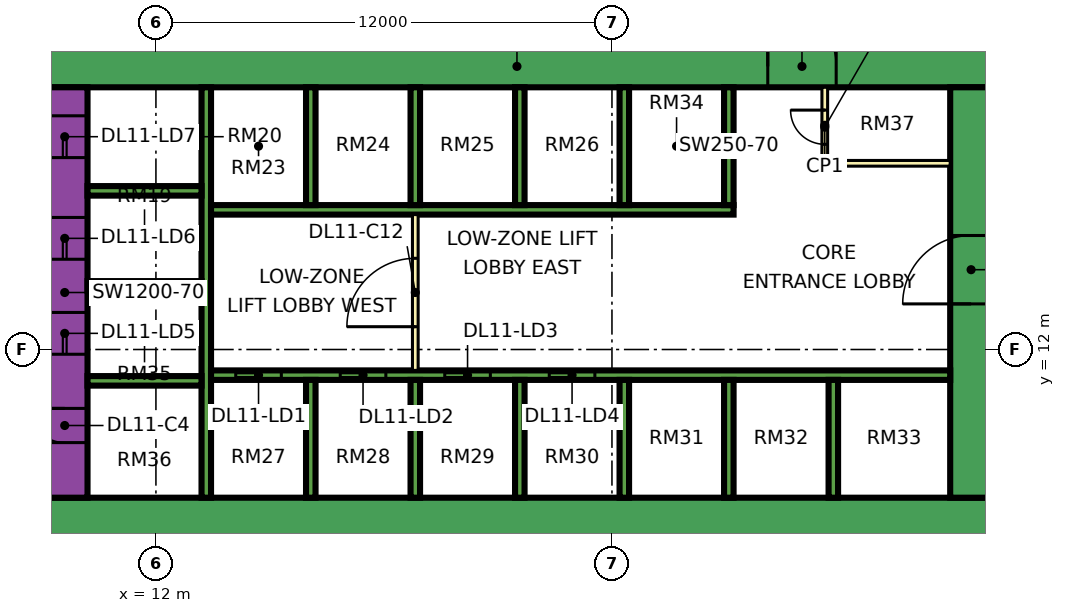
"""IFC4 building model, lengths in metres.
Left out: names, types, materials, properties, quantities, classifications, styles, units other than length and angle.
Written with IfcOpenShell. Run it as: python <this file> out.ifc"""

import sys

from ifc_helpers import new_model, si_unit, direction, frame, frame_2d, origin, place, context, subcontext, project, spatial, rectangle, extrude, element, fill, save


model = new_model("IFC4")
c1 = context("Model", 3, precision=1e-05, world=origin(), true_north=direction((0.0, 1.0)))
c2 = subcontext(c1, "Body", "Model", "MODEL_VIEW")
j1 = project(units=[si_unit("LENGTHUNIT", "METRE"), si_unit("PLANEANGLEUNIT", "RADIAN")], contexts=[c1])
p1 = place(None, origin())
s1 = spatial("IfcSite", under=j1, at=p1, CompositionType="ELEMENT")
p2 = place(p1, origin())
s2 = spatial("IfcBuilding", under=s1, at=p2, CompositionType="ELEMENT")
p3 = place(p2, frame((0.0, 0.0, 56.4)))
s3 = spatial("IfcBuildingStorey", under=s2, at=p3, CompositionType="ELEMENT", Elevation=56.4)
p4 = place(p3, frame((9.0, 7.55, 0.0), z_axis=(0.0, 0.0, 1.0), x_axis=(1.0, 0.0, 0.0)))
e1 = element("IfcWall", 1, at=p4, inside=s3, PredefinedType="SHEAR", context=c2, shape_type="SweptSolid", body=[
    extrude(rectangle(XDim=25.0, YDim=1.1, at=frame_2d((12.5, 0.0))), origin(), (0.0, 0.0, 1.0), 3.75),
])
p5 = place(p3, frame((9.0, 19.45, 0.0), z_axis=(0.0, 0.0, 1.0), x_axis=(1.0, 0.0, 0.0)))
e2 = element("IfcWall", 2, at=p5, inside=s3, PredefinedType="SHEAR", context=c2, shape_type="SweptSolid", body=[
    extrude(rectangle(XDim=25.0, YDim=1.1, at=frame_2d((12.5, 0.0))), origin(), (0.0, 0.0, 1.0), 3.75),
])
p6 = place(p5, frame((19.1, 0.0, 0.0)))
e3 = element("IfcOpeningElement", 3, at=p6, cuts=e2, PredefinedType="OPENING", context=c2, shape_type="SweptSolid", body=[
    extrude(rectangle(XDim=1.8, YDim=2.4, at=frame_2d((0.9, 1.2))), frame((0.0, 0.56, 0.0), z_axis=(0.0, -1.0, 0.0), x_axis=(1.0, 0.0, 0.0)), (0.0, 0.0, 1.0), 1.12),
])
p7 = place(p3, frame((9.6, 8.1, 0.0), z_axis=(0.0, 0.0, 1.0), x_axis=(0.0, 1.0, 0.0)))
e4 = element("IfcWall", 4, at=p7, inside=s3, PredefinedType="SHEAR", context=c2, shape_type="SweptSolid", body=[
    extrude(rectangle(XDim=10.8, YDim=1.2, at=frame_2d((5.4, 0.0))), origin(), (0.0, 0.0, 1.0), 3.75),
])
p8 = place(p7, frame((3.775, 0.0, 0.0)))
e5 = element("IfcOpeningElement", 5, at=p8, cuts=e4, PredefinedType="OPENING", context=c2, shape_type="SweptSolid", body=[
    extrude(rectangle(XDim=1.1, YDim=2.2, at=frame_2d((0.55, 1.1))), frame((0.0, 0.61, 0.0), z_axis=(0.0, -1.0, 0.0), x_axis=(1.0, 0.0, 0.0)), (0.0, 0.0, 1.0), 1.22),
])
p9 = place(p7, frame((6.275, 0.0, 0.0)))
e6 = element("IfcOpeningElement", 6, at=p9, cuts=e4, PredefinedType="OPENING", context=c2, shape_type="SweptSolid", body=[
    extrude(rectangle(XDim=1.1, YDim=2.2, at=frame_2d((0.55, 1.1))), frame((0.0, 0.61, 0.0), z_axis=(0.0, -1.0, 0.0), x_axis=(1.0, 0.0, 0.0)), (0.0, 0.0, 1.0), 1.22),
])
p10 = place(p7, frame((8.95, 0.0, 0.0)))
e7 = element("IfcOpeningElement", 7, at=p10, cuts=e4, PredefinedType="OPENING", context=c2, shape_type="SweptSolid", body=[
    extrude(rectangle(XDim=1.1, YDim=2.2, at=frame_2d((0.55, 1.1))), frame((0.0, 0.61, 0.0), z_axis=(0.0, -1.0, 0.0), x_axis=(1.0, 0.0, 0.0)), (0.0, 0.0, 1.0), 1.22),
])
p11 = place(p7, frame((1.45, 0.0, 0.0)))
e8 = element("IfcOpeningElement", 8, at=p11, cuts=e4, PredefinedType="OPENING", context=c2, shape_type="SweptSolid", body=[
    extrude(rectangle(XDim=0.9, YDim=2.1, at=frame_2d((0.45, 1.05))), frame((0.0, 0.61, 0.0), z_axis=(0.0, -1.0, 0.0), x_axis=(1.0, 0.0, 0.0)), (0.0, 0.0, 1.0), 1.22),
])
p12 = place(p3, frame((33.45, 8.1, 0.0), z_axis=(0.0, 0.0, 1.0), x_axis=(0.0, 1.0, 0.0)))
e9 = element("IfcWall", 9, at=p12, inside=s3, PredefinedType="SHEAR", context=c2, shape_type="SweptSolid", body=[
    extrude(rectangle(XDim=10.8, YDim=1.1, at=frame_2d((5.4, 0.0))), origin(), (0.0, 0.0, 1.0), 3.75),
])
p13 = place(p12, frame((5.1, 0.0, 0.0)))
e10 = element("IfcOpeningElement", 10, at=p13, cuts=e9, PredefinedType="OPENING", context=c2, shape_type="SweptSolid", body=[
    extrude(rectangle(XDim=1.8, YDim=2.4, at=frame_2d((0.9, 1.2))), frame((0.0, 0.56, 0.0), z_axis=(0.0, -1.0, 0.0), x_axis=(1.0, 0.0, 0.0)), (0.0, 0.0, 1.0), 1.12),
])
p14 = place(p3, frame((13.325, 8.1, 0.0), z_axis=(0.0, 0.0, 1.0), x_axis=(0.0, 1.0, 0.0)))
e11 = element("IfcWall", 11, at=p14, inside=s3, PredefinedType="SHEAR", context=c2, shape_type="SweptSolid", body=[
    extrude(rectangle(XDim=10.8, YDim=0.25, at=frame_2d((5.4, 0.0))), origin(), (0.0, 0.0, 1.0), 3.75),
])
p15 = place(p3, frame((13.45, 11.325, 0.0), z_axis=(0.0, 0.0, 1.0), x_axis=(1.0, 0.0, 0.0)))
e12 = element("IfcWall", 12, at=p15, inside=s3, PredefinedType="SHEAR", context=c2, shape_type="SweptSolid", body=[
    extrude(rectangle(XDim=19.45, YDim=0.25, at=frame_2d((9.725, 0.0))), origin(), (0.0, 0.0, 1.0), 3.75),
])
p16 = place(p15, frame((0.65, 0.0, 0.0)))
e13 = element("IfcOpeningElement", 13, at=p16, cuts=e12, PredefinedType="OPENING", context=c2, shape_type="SweptSolid", body=[
    extrude(rectangle(XDim=1.2, YDim=2.2, at=frame_2d((0.6, 1.1))), frame((0.0, 0.135, 0.0), z_axis=(0.0, -1.0, 0.0), x_axis=(1.0, 0.0, 0.0)), (0.0, 0.0, 1.0), 0.27),
])
p17 = place(p15, frame((3.4, 0.0, 0.0)))
e14 = element("IfcOpeningElement", 14, at=p17, cuts=e12, PredefinedType="OPENING", context=c2, shape_type="SweptSolid", body=[
    extrude(rectangle(XDim=1.2, YDim=2.2, at=frame_2d((0.6, 1.1))), frame((0.0, 0.135, 0.0), z_axis=(0.0, -1.0, 0.0), x_axis=(1.0, 0.0, 0.0)), (0.0, 0.0, 1.0), 0.27),
])
p18 = place(p15, frame((6.15, 0.0, 0.0)))
e15 = element("IfcOpeningElement", 15, at=p18, cuts=e12, PredefinedType="OPENING", context=c2, shape_type="SweptSolid", body=[
    extrude(rectangle(XDim=1.2, YDim=2.2, at=frame_2d((0.6, 1.1))), frame((0.0, 0.135, 0.0), z_axis=(0.0, -1.0, 0.0), x_axis=(1.0, 0.0, 0.0)), (0.0, 0.0, 1.0), 0.27),
])
p19 = place(p15, frame((8.9, 0.0, 0.0)))
e16 = element("IfcOpeningElement", 16, at=p19, cuts=e12, PredefinedType="OPENING", context=c2, shape_type="SweptSolid", body=[
    extrude(rectangle(XDim=1.2, YDim=2.2, at=frame_2d((0.6, 1.1))), frame((0.0, 0.135, 0.0), z_axis=(0.0, -1.0, 0.0), x_axis=(1.0, 0.0, 0.0)), (0.0, 0.0, 1.0), 0.27),
])
p20 = place(p3, frame((13.45, 15.675, 0.0), z_axis=(0.0, 0.0, 1.0), x_axis=(1.0, 0.0, 0.0)))
e17 = element("IfcWall", 17, at=p20, inside=s3, PredefinedType="SHEAR", context=c2, shape_type="SweptSolid", body=[
    extrude(rectangle(XDim=13.75, YDim=0.25, at=frame_2d((6.875, 0.0))), origin(), (0.0, 0.0, 1.0), 3.75),
])
for number, where, z_axis, x_axis in (
    (18, (10.2, 11.175, 0.0), (0.0, 0.0, 1.0), (1.0, 0.0, 0.0)),
    (19, (10.2, 13.675, 0.0), (0.0, 0.0, 1.0), (1.0, 0.0, 0.0)),
    (20, (10.2, 16.175, 0.0), (0.0, 0.0, 1.0), (1.0, 0.0, 0.0)),
):
    element("IfcWall", number, at=place(p3, frame(where, z_axis=z_axis, x_axis=x_axis)), inside=s3, PredefinedType="SHEAR", context=c2, shape_type="SweptSolid", body=[
        extrude(rectangle(XDim=3.0, YDim=0.25, at=frame_2d((1.5, 0.0))), origin(), (0.0, 0.0, 1.0), 3.75),
    ])
for number, where, z_axis, x_axis in (
    (21, (16.075, 8.1, 0.0), (0.0, 0.0, 1.0), (0.0, 1.0, 0.0)),
    (22, (18.825, 8.1, 0.0), (0.0, 0.0, 1.0), (0.0, 1.0, 0.0)),
    (23, (21.575, 8.1, 0.0), (0.0, 0.0, 1.0), (0.0, 1.0, 0.0)),
    (24, (24.325, 8.1, 0.0), (0.0, 0.0, 1.0), (0.0, 1.0, 0.0)),
    (25, (27.075, 8.1, 0.0), (0.0, 0.0, 1.0), (0.0, 1.0, 0.0)),
    (26, (29.825, 8.1, 0.0), (0.0, 0.0, 1.0), (0.0, 1.0, 0.0)),
    (27, (16.075, 15.8, 0.0), (0.0, 0.0, 1.0), (0.0, 1.0, 0.0)),
    (28, (18.825, 15.8, 0.0), (0.0, 0.0, 1.0), (0.0, 1.0, 0.0)),
    (29, (21.575, 15.8, 0.0), (0.0, 0.0, 1.0), (0.0, 1.0, 0.0)),
    (30, (24.325, 15.8, 0.0), (0.0, 0.0, 1.0), (0.0, 1.0, 0.0)),
    (31, (27.075, 15.8, 0.0), (0.0, 0.0, 1.0), (0.0, 1.0, 0.0)),
):
    element("IfcWall", number, at=place(p3, frame(where, z_axis=z_axis, x_axis=x_axis)), inside=s3, PredefinedType="SHEAR", context=c2, shape_type="SweptSolid", body=[
        extrude(rectangle(XDim=3.1, YDim=0.25, at=frame_2d((1.55, 0.0))), origin(), (0.0, 0.0, 1.0), 3.75),
    ])
p21 = place(p3, frame((-1.447, 12.553, 0.0), z_axis=(0.0, 0.0, 1.0), x_axis=(0.707106781187, -0.707106781187, 0.0)))
e32 = element("IfcWall", 32, at=p21, inside=s3, PredefinedType="SOLIDWALL", context=c2, shape_type="SweptSolid", body=[
    extrude(rectangle(XDim=19.799, YDim=0.15, at=frame_2d((9.899, 0.0))), origin(), (0.0, 0.0, 1.0), 3.35),
])
p22 = place(p21, frame((2.212, 0.0, 0.45)))
e33 = element("IfcOpeningElement", 33, at=p22, cuts=e32, PredefinedType="OPENING", context=c2, shape_type="SweptSolid", body=[
    extrude(rectangle(XDim=3.0, YDim=2.4, at=frame_2d((1.5, 1.2))), frame((0.0, 0.085, 0.0), z_axis=(0.0, -1.0, 0.0), x_axis=(1.0, 0.0, 0.0)), (0.0, 0.0, 1.0), 0.17),
])
p23 = place(p21, frame((10.216, 0.0, 0.45)))
e34 = element("IfcOpeningElement", 34, at=p23, cuts=e32, PredefinedType="OPENING", context=c2, shape_type="SweptSolid", body=[
    extrude(rectangle(XDim=3.0, YDim=2.4, at=frame_2d((1.5, 1.2))), frame((0.0, 0.085, 0.0), z_axis=(0.0, -1.0, 0.0), x_axis=(1.0, 0.0, 0.0)), (0.0, 0.0, 1.0), 0.17),
])
p24 = place(p3, frame((18.825, 11.45, 0.0), z_axis=(0.0, 0.0, 1.0), x_axis=(0.0, 1.0, 0.0)))
e35 = element("IfcWall", 35, at=p24, inside=s3, PredefinedType="PARTITIONING", context=c2, shape_type="SweptSolid", body=[
    extrude(rectangle(XDim=4.1, YDim=0.15, at=frame_2d((2.05, 0.0))), origin(), (0.0, 0.0, 1.0), 3.35),
])
p25 = place(p24, frame((1.15, 0.0, 0.0)))
e36 = element("IfcOpeningElement", 36, at=p25, cuts=e35, PredefinedType="OPENING", context=c2, shape_type="SweptSolid", body=[
    extrude(rectangle(XDim=1.8, YDim=2.4, at=frame_2d((0.9, 1.2))), frame((0.0, 0.085, 0.0), z_axis=(0.0, -1.0, 0.0), x_axis=(1.0, 0.0, 0.0)), (0.0, 0.0, 1.0), 0.17),
])
p26 = place(p3, frame((29.6, 16.9, 0.0), z_axis=(0.0, 0.0, 1.0), x_axis=(0.0, 1.0, 0.0)))
e37 = element("IfcWall", 37, at=p26, inside=s3, PredefinedType="PARTITIONING", context=c2, shape_type="SweptSolid", body=[
    extrude(rectangle(XDim=2.0, YDim=0.15, at=frame_2d((1.0, 0.0))), origin(), (0.0, 0.0, 1.0), 3.35),
])
p27 = place(p26, frame((0.5, 0.0, 0.0)))
e38 = element("IfcOpeningElement", 38, at=p27, cuts=e37, PredefinedType="OPENING", context=c2, shape_type="SweptSolid", body=[
    extrude(rectangle(XDim=0.9, YDim=2.1, at=frame_2d((0.45, 1.05))), frame((0.0, 0.085, 0.0), z_axis=(0.0, -1.0, 0.0), x_axis=(1.0, 0.0, 0.0)), (0.0, 0.0, 1.0), 0.17),
])
p28 = place(p3, frame((29.6, 16.9, 0.0), z_axis=(0.0, 0.0, 1.0), x_axis=(1.0, 0.0, 0.0)))
e39 = element("IfcWall", 39, at=p28, inside=s3, PredefinedType="PARTITIONING", context=c2, shape_type="SweptSolid", body=[
    extrude(rectangle(XDim=3.3, YDim=0.15, at=frame_2d((1.65, 0.0))), origin(), (0.0, 0.0, 1.0), 3.35),
])
p29 = place(p16, origin())
e40 = element("IfcDoor", 40, at=p29, inside=s3, OperationType="DOUBLE_DOOR_SLIDING", PredefinedType="DOOR", context=c2, shape_type="SweptSolid", body=[
    extrude(rectangle(XDim=1.2, YDim=2.2, at=frame_2d((0.6, 1.1))), frame((0.0, 0.025, 0.0), z_axis=(0.0, -1.0, 0.0), x_axis=(1.0, 0.0, 0.0)), (0.0, 0.0, 1.0), 0.05),
])
fill(e13, e40)
p30 = place(p17, origin())
e41 = element("IfcDoor", 41, at=p30, inside=s3, OperationType="DOUBLE_DOOR_SLIDING", PredefinedType="DOOR", context=c2, shape_type="SweptSolid", body=[
    extrude(rectangle(XDim=1.2, YDim=2.2, at=frame_2d((0.6, 1.1))), frame((0.0, 0.025, 0.0), z_axis=(0.0, -1.0, 0.0), x_axis=(1.0, 0.0, 0.0)), (0.0, 0.0, 1.0), 0.05),
])
fill(e14, e41)
p31 = place(p18, origin())
e42 = element("IfcDoor", 42, at=p31, inside=s3, OperationType="DOUBLE_DOOR_SLIDING", PredefinedType="DOOR", context=c2, shape_type="SweptSolid", body=[
    extrude(rectangle(XDim=1.2, YDim=2.2, at=frame_2d((0.6, 1.1))), frame((0.0, 0.025, 0.0), z_axis=(0.0, -1.0, 0.0), x_axis=(1.0, 0.0, 0.0)), (0.0, 0.0, 1.0), 0.05),
])
fill(e15, e42)
p32 = place(p19, origin())
e43 = element("IfcDoor", 43, at=p32, inside=s3, OperationType="DOUBLE_DOOR_SLIDING", PredefinedType="DOOR", context=c2, shape_type="SweptSolid", body=[
    extrude(rectangle(XDim=1.2, YDim=2.2, at=frame_2d((0.6, 1.1))), frame((0.0, 0.025, 0.0), z_axis=(0.0, -1.0, 0.0), x_axis=(1.0, 0.0, 0.0)), (0.0, 0.0, 1.0), 0.05),
])
fill(e16, e43)
p33 = place(p8, origin())
e44 = element("IfcDoor", 44, at=p33, inside=s3, OperationType="DOUBLE_DOOR_SLIDING", PredefinedType="DOOR", context=c2, shape_type="SweptSolid", body=[
    extrude(rectangle(XDim=1.1, YDim=2.2, at=frame_2d((0.55, 1.1))), frame((0.0, 0.025, 0.0), z_axis=(0.0, -1.0, 0.0), x_axis=(1.0, 0.0, 0.0)), (0.0, 0.0, 1.0), 0.05),
])
fill(e5, e44)
p34 = place(p9, origin())
e45 = element("IfcDoor", 45, at=p34, inside=s3, OperationType="DOUBLE_DOOR_SLIDING", PredefinedType="DOOR", context=c2, shape_type="SweptSolid", body=[
    extrude(rectangle(XDim=1.1, YDim=2.2, at=frame_2d((0.55, 1.1))), frame((0.0, 0.025, 0.0), z_axis=(0.0, -1.0, 0.0), x_axis=(1.0, 0.0, 0.0)), (0.0, 0.0, 1.0), 0.05),
])
fill(e6, e45)
p35 = place(p10, origin())
e46 = element("IfcDoor", 46, at=p35, inside=s3, OperationType="DOUBLE_DOOR_SLIDING", PredefinedType="DOOR", context=c2, shape_type="SweptSolid", body=[
    extrude(rectangle(XDim=1.1, YDim=2.2, at=frame_2d((0.55, 1.1))), frame((0.0, 0.025, 0.0), z_axis=(0.0, -1.0, 0.0), x_axis=(1.0, 0.0, 0.0)), (0.0, 0.0, 1.0), 0.05),
])
fill(e7, e46)
p36 = place(p13, origin())
e47 = element("IfcDoor", 47, at=p36, inside=s3, OperationType="DOUBLE_DOOR_SINGLE_SWING", PredefinedType="DOOR", context=c2, shape_type="SweptSolid", body=[
    extrude(rectangle(XDim=1.8, YDim=2.4, at=frame_2d((0.9, 1.2))), frame((0.0, 0.025, 0.0), z_axis=(0.0, -1.0, 0.0), x_axis=(1.0, 0.0, 0.0)), (0.0, 0.0, 1.0), 0.05),
])
fill(e10, e47)
p37 = place(p6, origin())
e48 = element("IfcDoor", 48, at=p37, inside=s3, OperationType="DOUBLE_DOOR_SINGLE_SWING", PredefinedType="DOOR", context=c2, shape_type="SweptSolid", body=[
    extrude(rectangle(XDim=1.8, YDim=2.4, at=frame_2d((0.9, 1.2))), frame((0.0, 0.025, 0.0), z_axis=(0.0, -1.0, 0.0), x_axis=(1.0, 0.0, 0.0)), (0.0, 0.0, 1.0), 0.05),
])
fill(e3, e48)
p38 = place(p11, frame((0.9, 0.0, 0.0), z_axis=(0.0, 0.0, 1.0), x_axis=(-1.0, 0.0, 0.0)))
e49 = element("IfcDoor", 49, at=p38, inside=s3, OperationType="SINGLE_SWING_RIGHT", PredefinedType="DOOR", context=c2, shape_type="SweptSolid", body=[
    extrude(rectangle(XDim=0.9, YDim=2.1, at=frame_2d((0.45, 1.05))), frame((0.0, 0.025, 0.0), z_axis=(0.0, -1.0, 0.0), x_axis=(1.0, 0.0, 0.0)), (0.0, 0.0, 1.0), 0.05),
])
fill(e8, e49)
p39 = place(p25, origin())
e50 = element("IfcDoor", 50, at=p39, inside=s3, OperationType="DOUBLE_DOOR_SINGLE_SWING", PredefinedType="DOOR", context=c2, shape_type="SweptSolid", body=[
    extrude(rectangle(XDim=1.8, YDim=2.4, at=frame_2d((0.9, 1.2))), frame((0.0, 0.025, 0.0), z_axis=(0.0, -1.0, 0.0), x_axis=(1.0, 0.0, 0.0)), (0.0, 0.0, 1.0), 0.05),
])
fill(e36, e50)
p40 = place(p27, frame((0.9, 0.0, 0.0), z_axis=(0.0, 0.0, 1.0), x_axis=(-1.0, 0.0, 0.0)))
e51 = element("IfcDoor", 51, at=p40, inside=s3, OperationType="SINGLE_SWING_RIGHT", PredefinedType="DOOR", context=c2, shape_type="SweptSolid", body=[
    extrude(rectangle(XDim=0.9, YDim=2.1, at=frame_2d((0.45, 1.05))), frame((0.0, 0.025, 0.0), z_axis=(0.0, -1.0, 0.0), x_axis=(1.0, 0.0, 0.0)), (0.0, 0.0, 1.0), 0.05),
])
fill(e38, e51)
save(model, sys.argv[1])
